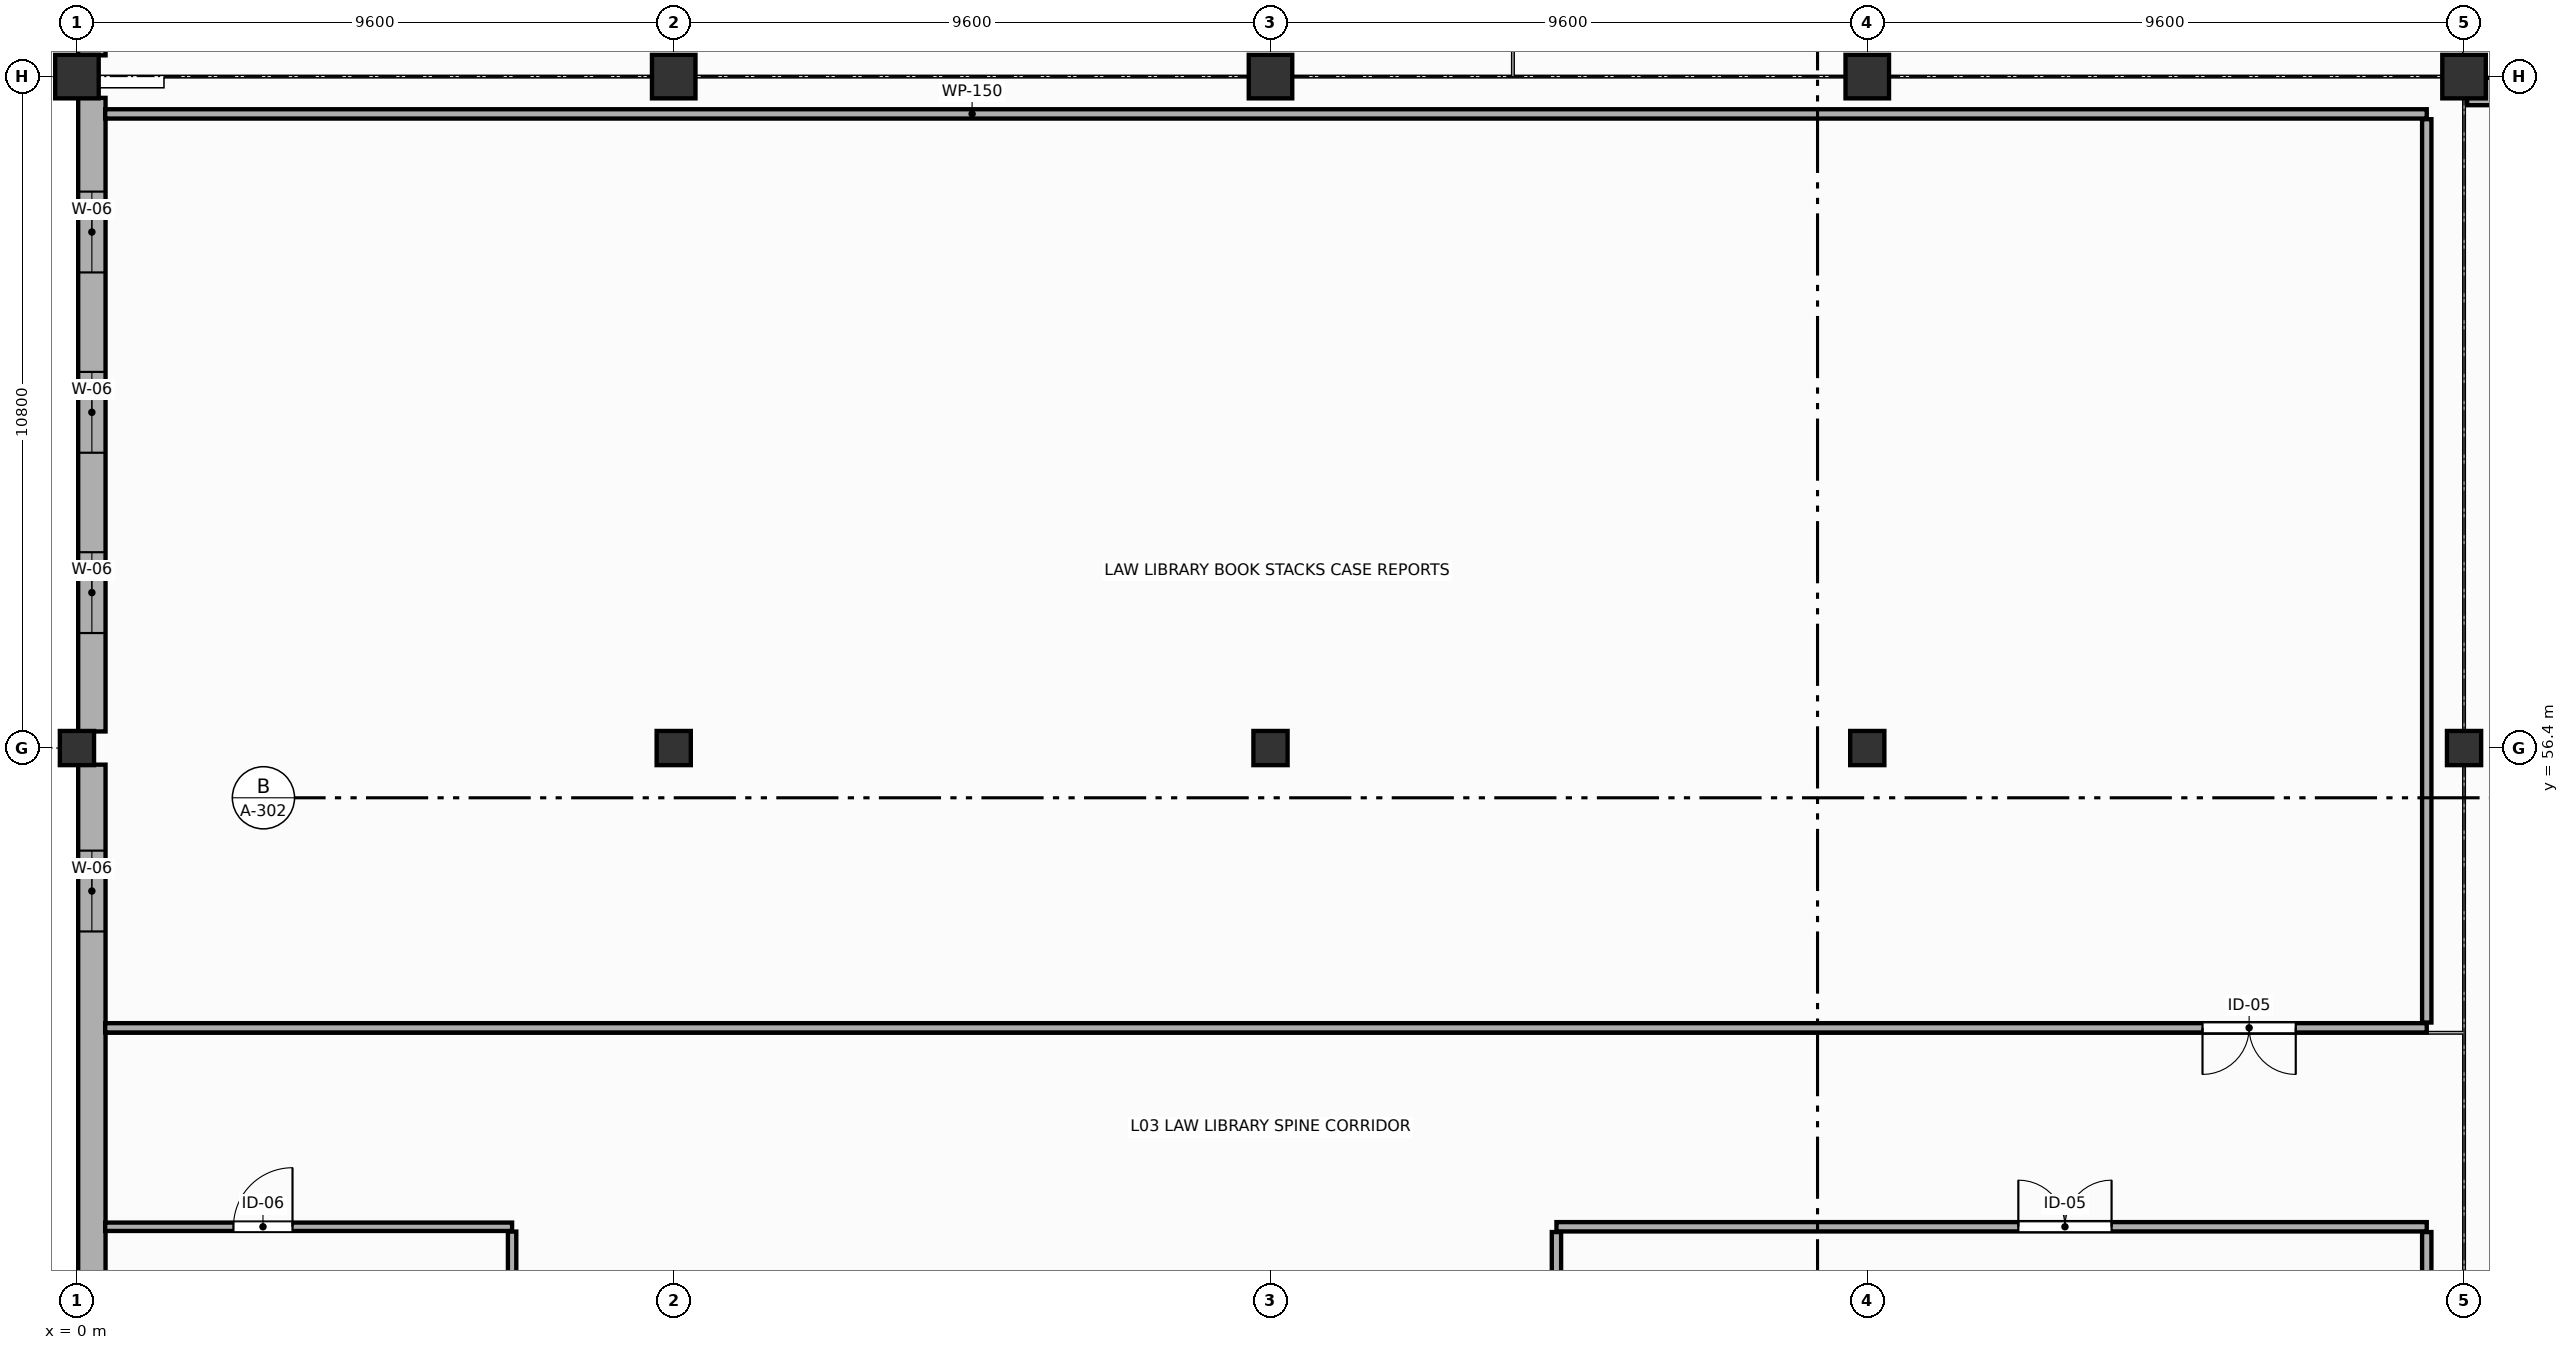
"""IFC4 building model, lengths in metres.
Left out: names, types, materials, properties, quantities, classifications, styles, units other than length and angle.
Written with IfcOpenShell. Run it as: python <this file> out.ifc"""

import sys

from ifc_helpers import new_model, si_unit, direction, frame, frame_2d, origin, origin_2d, place, context, subcontext, project, spatial, rectangle, extrude, element, fill, save


model = new_model("IFC4")
c1 = context("Model", 3, precision=1e-05, world=origin(), true_north=direction((0.0, 1.0)))
c2 = subcontext(c1, "Body", "Model", "MODEL_VIEW")
j1 = project(units=[si_unit("LENGTHUNIT", "METRE"), si_unit("PLANEANGLEUNIT", "RADIAN")], contexts=[c1])
p1 = place(None, origin())
s1 = spatial("IfcSite", under=j1, at=p1, CompositionType="ELEMENT")
p2 = place(p1, origin())
s2 = spatial("IfcBuilding", under=s1, at=p2, CompositionType="ELEMENT")
p3 = place(p2, frame((0.0, 0.0, 9.9)))
s3 = spatial("IfcBuildingStorey", under=s2, at=p3, CompositionType="ELEMENT", Elevation=9.9)
for number, where, z_axis, x_axis in (
    (1, (0.0, 67.2, 0.0), (0.0, 0.0, 1.0), (1.0, 0.0, 0.0)),
    (2, (9.6, 67.2, 0.0), (0.0, 0.0, 1.0), (1.0, 0.0, 0.0)),
    (3, (19.2, 67.2, 0.0), (0.0, 0.0, 1.0), (1.0, 0.0, 0.0)),
    (4, (28.8, 67.2, 0.0), (0.0, 0.0, 1.0), (1.0, 0.0, 0.0)),
    (5, (38.4, 67.2, 0.0), (0.0, 0.0, 1.0), (1.0, 0.0, 0.0)),
):
    element("IfcColumn", number, at=place(p3, frame(where, z_axis=z_axis, x_axis=x_axis)), inside=s3, PredefinedType="COLUMN", context=c2, shape_type="SweptSolid", body=[
        extrude(rectangle(XDim=0.7, YDim=0.7, at=origin_2d()), origin(), (0.0, 0.0, 1.0), 4.5),
    ])
for number, where, z_axis, x_axis in (
    (6, (0.0, 56.4, 0.0), (0.0, 0.0, 1.0), (1.0, 0.0, 0.0)),
    (7, (9.6, 56.4, 0.0), (0.0, 0.0, 1.0), (1.0, 0.0, 0.0)),
    (8, (19.2, 56.4, 0.0), (0.0, 0.0, 1.0), (1.0, 0.0, 0.0)),
    (9, (28.8, 56.4, 0.0), (0.0, 0.0, 1.0), (1.0, 0.0, 0.0)),
    (10, (38.4, 56.4, 0.0), (0.0, 0.0, 1.0), (1.0, 0.0, 0.0)),
):
    element("IfcColumn", number, at=place(p3, frame(where, z_axis=z_axis, x_axis=x_axis)), inside=s3, PredefinedType="COLUMN", context=c2, shape_type="SweptSolid", body=[
        extrude(rectangle(XDim=0.55, YDim=0.55, at=origin_2d()), origin(), (0.0, 0.0, 1.0), 4.5),
    ])
p4 = place(p3, frame((0.24, 67.542, 0.0), z_axis=(0.0, 0.0, 1.0), x_axis=(0.0, 1.0, 0.0)))
e11 = element("IfcWall", 11, at=p4, inside=s3, PredefinedType="STANDARD", context=c2, shape_type="SweptSolid", body=[
    extrude(rectangle(XDim=6.521, YDim=0.44, at=frame_2d((3.26, 0.0))), origin(), (0.0, 0.0, 1.0), 3.43),
])
p5 = place(p4, frame((1.303, 0.0, 0.85)))
e12 = element("IfcOpeningElement", 12, at=p5, cuts=e11, PredefinedType="OPENING", context=c2, shape_type="SweptSolid", body=[
    extrude(rectangle(XDim=1.7, YDim=2.3, at=frame_2d((0.85, 1.15))), frame((0.0, 0.23, 0.0), z_axis=(0.0, -1.0, 0.0), x_axis=(1.0, 0.0, 0.0)), (0.0, 0.0, 1.0), 0.46),
])
p6 = place(p4, frame((3.753, 0.0, 0.85)))
e13 = element("IfcOpeningElement", 13, at=p6, cuts=e11, PredefinedType="OPENING", context=c2, shape_type="SweptSolid", body=[
    extrude(rectangle(XDim=1.7, YDim=2.3, at=frame_2d((0.85, 1.15))), frame((0.0, 0.23, 0.0), z_axis=(0.0, -1.0, 0.0), x_axis=(1.0, 0.0, 0.0)), (0.0, 0.0, 1.0), 0.46),
])
p7 = place(p3, frame((0.24, 47.067, 0.0), z_axis=(0.0, 0.0, 1.0), x_axis=(0.0, 1.0, 0.0)))
e14 = element("IfcWall", 14, at=p7, inside=s3, PredefinedType="STANDARD", context=c2, shape_type="SweptSolid", body=[
    extrude(rectangle(XDim=9.066, YDim=0.44, at=frame_2d((4.533, 0.0))), origin(), (0.0, 0.0, 1.0), 3.38),
])
p8 = place(p7, frame((6.383, 0.0, 0.9)))
e15 = element("IfcOpeningElement", 15, at=p8, cuts=e14, PredefinedType="OPENING", context=c2, shape_type="SweptSolid", body=[
    extrude(rectangle(XDim=1.3, YDim=2.1, at=frame_2d((0.65, 1.05))), frame((0.0, 0.23, 0.0), z_axis=(0.0, -1.0, 0.0), x_axis=(1.0, 0.0, 0.0)), (0.0, 0.0, 1.0), 0.46),
])
p9 = place(p3, frame((0.24, 56.667, 0.0), z_axis=(0.0, 0.0, 1.0), x_axis=(0.0, 1.0, 0.0)))
e16 = element("IfcWall", 16, at=p9, inside=s3, PredefinedType="STANDARD", context=c2, shape_type="SweptSolid", body=[
    extrude(rectangle(XDim=10.191, YDim=0.44, at=frame_2d((5.095, 0.0))), origin(), (0.0, 0.0, 1.0), 3.38),
])
p10 = place(p9, frame((1.583, 0.0, 0.9)))
e17 = element("IfcOpeningElement", 17, at=p10, cuts=e16, PredefinedType="OPENING", context=c2, shape_type="SweptSolid", body=[
    extrude(rectangle(XDim=1.3, YDim=2.1, at=frame_2d((0.65, 1.05))), frame((0.0, 0.23, 0.0), z_axis=(0.0, -1.0, 0.0), x_axis=(1.0, 0.0, 0.0)), (0.0, 0.0, 1.0), 0.46),
])
p11 = place(p9, frame((4.483, 0.0, 0.9)))
e18 = element("IfcOpeningElement", 18, at=p11, cuts=e16, PredefinedType="OPENING", context=c2, shape_type="SweptSolid", body=[
    extrude(rectangle(XDim=1.3, YDim=2.1, at=frame_2d((0.65, 1.05))), frame((0.0, 0.23, 0.0), z_axis=(0.0, -1.0, 0.0), x_axis=(1.0, 0.0, 0.0)), (0.0, 0.0, 1.0), 0.46),
])
p12 = place(p9, frame((7.383, 0.0, 0.9)))
e19 = element("IfcOpeningElement", 19, at=p12, cuts=e16, PredefinedType="OPENING", context=c2, shape_type="SweptSolid", body=[
    extrude(rectangle(XDim=1.3, YDim=2.1, at=frame_2d((0.65, 1.05))), frame((0.0, 0.23, 0.0), z_axis=(0.0, -1.0, 0.0), x_axis=(1.0, 0.0, 0.0)), (0.0, 0.0, 1.0), 0.46),
])
p13 = place(p3, frame((38.45, 66.96, 0.0), z_axis=(0.0, 0.0, 1.0), x_axis=(1.0, 0.0, 0.0)))
e20 = element("IfcWall", 20, at=p13, inside=s3, PredefinedType="STANDARD", context=c2, shape_type="SweptSolid", body=[
    extrude(rectangle(XDim=7.55, YDim=0.44, at=frame_2d((3.775, 0.0))), origin(), (0.0, 0.0, 1.0), 3.28),
])
p14 = place(p3, frame((0.454, 66.6, 0.0), z_axis=(0.0, 0.0, 1.0), x_axis=(1.0, 0.0, 0.0)))
e21 = element("IfcWall", 21, at=p14, inside=s3, PredefinedType="PARTITIONING", context=c2, shape_type="SweptSolid", body=[
    extrude(rectangle(XDim=37.346, YDim=0.15, at=frame_2d((18.673, 0.0))), origin(), (0.0, 0.0, 1.0), 3.38),
])
p15 = place(p3, frame((37.8, 51.9, 0.0), z_axis=(0.0, 0.0, 1.0), x_axis=(-1.0, 0.0, 0.0)))
e22 = element("IfcWall", 22, at=p15, inside=s3, PredefinedType="PARTITIONING", context=c2, shape_type="SweptSolid", body=[
    extrude(rectangle(XDim=37.346, YDim=0.15, at=frame_2d((18.673, 0.0))), origin(), (0.0, 0.0, 1.0), 3.23),
])
p16 = place(p15, frame((2.107, 0.0, 0.0)))
e23 = element("IfcOpeningElement", 23, at=p16, cuts=e22, PredefinedType="OPENING", context=c2, shape_type="SweptSolid", body=[
    extrude(rectangle(XDim=1.5, YDim=2.35, at=frame_2d((0.75, 1.175))), frame((0.0, 0.085, 0.0), z_axis=(0.0, -1.0, 0.0), x_axis=(1.0, 0.0, 0.0)), (0.0, 0.0, 1.0), 0.17),
])
p17 = place(p3, frame((37.8, 66.515, 0.0), z_axis=(0.0, 0.0, 1.0), x_axis=(0.0, -1.0, 0.0)))
e24 = element("IfcWall", 24, at=p17, inside=s3, PredefinedType="PARTITIONING", context=c2, shape_type="SweptSolid", body=[
    extrude(rectangle(XDim=14.53, YDim=0.15, at=frame_2d((7.265, 0.0))), origin(), (0.0, 0.0, 1.0), 3.53),
])
p18 = place(p3, frame((0.454, 48.7, 0.0), z_axis=(0.0, 0.0, 1.0), x_axis=(1.0, 0.0, 0.0)))
e25 = element("IfcWall", 25, at=p18, inside=s3, PredefinedType="PARTITIONING", context=c2, shape_type="SweptSolid", body=[
    extrude(rectangle(XDim=6.546, YDim=0.135, at=frame_2d((3.273, 0.0))), origin(), (0.0, 0.0, 1.0), 3.38),
])
p19 = place(p18, frame((2.064, 0.0, 0.0)))
e26 = element("IfcOpeningElement", 26, at=p19, cuts=e25, PredefinedType="OPENING", context=c2, shape_type="SweptSolid", body=[
    extrude(rectangle(XDim=0.95, YDim=2.15, at=frame_2d((0.475, 1.075))), frame((0.0, 0.077, 0.0), z_axis=(0.0, -1.0, 0.0), x_axis=(1.0, 0.0, 0.0)), (0.0, 0.0, 1.0), 0.155),
])
p20 = place(p3, frame((7.0, 48.623, 0.0), z_axis=(0.0, 0.0, 1.0), x_axis=(0.0, -1.0, 0.0)))
e27 = element("IfcWall", 27, at=p20, inside=s3, PredefinedType="PARTITIONING", context=c2, shape_type="SweptSolid", body=[
    extrude(rectangle(XDim=11.448, YDim=0.135, at=frame_2d((5.724, 0.0))), origin(), (0.0, 0.0, 1.0), 3.53),
])
p21 = place(p3, frame((23.8, 48.7, 0.0), z_axis=(0.0, 0.0, 1.0), x_axis=(1.0, 0.0, 0.0)))
e28 = element("IfcWall", 28, at=p21, inside=s3, PredefinedType="PARTITIONING", context=c2, shape_type="SweptSolid", body=[
    extrude(rectangle(XDim=14.0, YDim=0.15, at=frame_2d((7.0, 0.0))), origin(), (0.0, 0.0, 1.0), 3.38),
])
p22 = place(p21, frame((7.43, 0.0, 0.0)))
e29 = element("IfcOpeningElement", 29, at=p22, cuts=e28, PredefinedType="OPENING", context=c2, shape_type="SweptSolid", body=[
    extrude(rectangle(XDim=1.5, YDim=2.35, at=frame_2d((0.75, 1.175))), frame((0.0, 0.085, 0.0), z_axis=(0.0, -1.0, 0.0), x_axis=(1.0, 0.0, 0.0)), (0.0, 0.0, 1.0), 0.17),
])
for number, where, z_axis, x_axis in (
    (30, (23.8, 37.885, 0.0), (0.0, 0.0, 1.0), (0.0, 1.0, 0.0)),
    (31, (37.8, 48.615, 0.0), (0.0, 0.0, 1.0), (0.0, -1.0, 0.0)),
):
    element("IfcWall", number, at=place(p3, frame(where, z_axis=z_axis, x_axis=x_axis)), inside=s3, PredefinedType="PARTITIONING", context=c2, shape_type="SweptSolid", body=[
        extrude(rectangle(XDim=10.73, YDim=0.15, at=frame_2d((5.365, 0.0))), origin(), (0.0, 0.0, 1.0), 3.53),
    ])
p23 = place(p8, origin())
e32 = element("IfcWindow", 32, at=p23, inside=s3, PartitioningType="SINGLE_PANEL", PredefinedType="WINDOW", context=c2, shape_type="SweptSolid", body=[
    extrude(rectangle(XDim=1.3, YDim=2.1, at=frame_2d((0.65, 1.05))), frame((0.0, 0.03, 0.0), z_axis=(0.0, -1.0, 0.0), x_axis=(1.0, 0.0, 0.0)), (0.0, 0.0, 1.0), 0.06),
])
fill(e15, e32)
p24 = place(p10, origin())
e33 = element("IfcWindow", 33, at=p24, inside=s3, PartitioningType="SINGLE_PANEL", PredefinedType="WINDOW", context=c2, shape_type="SweptSolid", body=[
    extrude(rectangle(XDim=1.3, YDim=2.1, at=frame_2d((0.65, 1.05))), frame((0.0, 0.03, 0.0), z_axis=(0.0, -1.0, 0.0), x_axis=(1.0, 0.0, 0.0)), (0.0, 0.0, 1.0), 0.06),
])
fill(e17, e33)
p25 = place(p11, origin())
e34 = element("IfcWindow", 34, at=p25, inside=s3, PartitioningType="SINGLE_PANEL", PredefinedType="WINDOW", context=c2, shape_type="SweptSolid", body=[
    extrude(rectangle(XDim=1.3, YDim=2.1, at=frame_2d((0.65, 1.05))), frame((0.0, 0.03, 0.0), z_axis=(0.0, -1.0, 0.0), x_axis=(1.0, 0.0, 0.0)), (0.0, 0.0, 1.0), 0.06),
])
fill(e18, e34)
p26 = place(p12, origin())
e35 = element("IfcWindow", 35, at=p26, inside=s3, PartitioningType="SINGLE_PANEL", PredefinedType="WINDOW", context=c2, shape_type="SweptSolid", body=[
    extrude(rectangle(XDim=1.3, YDim=2.1, at=frame_2d((0.65, 1.05))), frame((0.0, 0.03, 0.0), z_axis=(0.0, -1.0, 0.0), x_axis=(1.0, 0.0, 0.0)), (0.0, 0.0, 1.0), 0.06),
])
fill(e19, e35)
p27 = place(p16, origin())
e36 = element("IfcDoor", 36, at=p27, inside=s3, OperationType="DOUBLE_DOOR_SINGLE_SWING", PredefinedType="DOOR", context=c2, shape_type="SweptSolid", body=[
    extrude(rectangle(XDim=1.5, YDim=2.35, at=frame_2d((0.75, 1.175))), frame((0.0, 0.025, 0.0), z_axis=(0.0, -1.0, 0.0), x_axis=(1.0, 0.0, 0.0)), (0.0, 0.0, 1.0), 0.05),
])
fill(e23, e36)
p28 = place(p19, origin())
e37 = element("IfcDoor", 37, at=p28, inside=s3, OperationType="SINGLE_SWING_RIGHT", PredefinedType="DOOR", context=c2, shape_type="SweptSolid", body=[
    extrude(rectangle(XDim=0.95, YDim=2.15, at=frame_2d((0.475, 1.075))), frame((0.0, 0.025, 0.0), z_axis=(0.0, -1.0, 0.0), x_axis=(1.0, 0.0, 0.0)), (0.0, 0.0, 1.0), 0.05),
])
fill(e26, e37)
p29 = place(p22, origin())
e38 = element("IfcDoor", 38, at=p29, inside=s3, OperationType="DOUBLE_DOOR_SINGLE_SWING", PredefinedType="DOOR", context=c2, shape_type="SweptSolid", body=[
    extrude(rectangle(XDim=1.5, YDim=2.35, at=frame_2d((0.75, 1.175))), frame((0.0, 0.025, 0.0), z_axis=(0.0, -1.0, 0.0), x_axis=(1.0, 0.0, 0.0)), (0.0, 0.0, 1.0), 0.05),
])
fill(e29, e38)
save(model, sys.argv[1])
